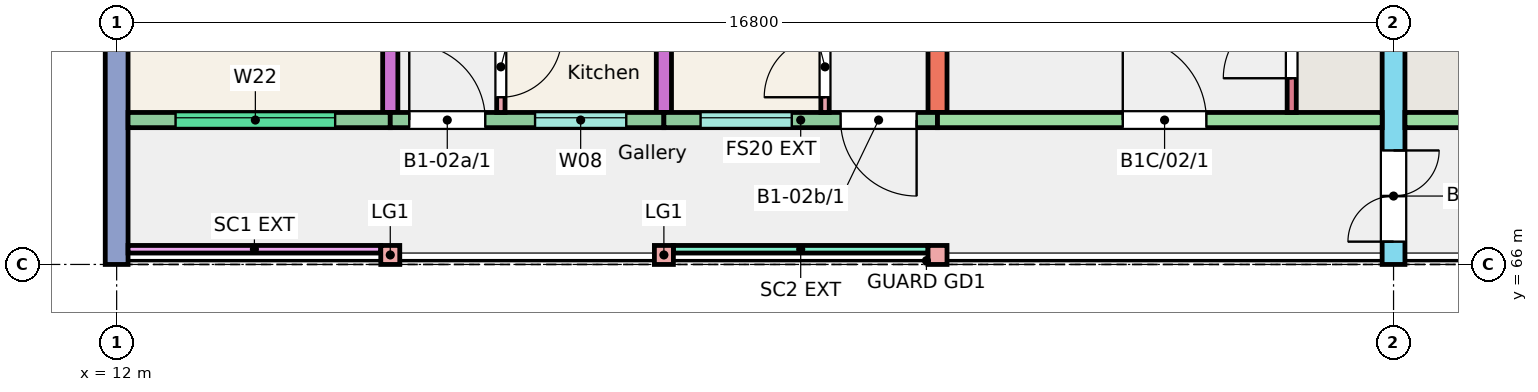
"""IFC4 building model, lengths in metres.
Left out: names, types, materials, properties, quantities, classifications, styles, units other than length and angle.
Written with IfcOpenShell. Run it as: python <this file> out.ifc"""

import sys

from ifc_helpers import new_model, si_unit, direction, frame, frame_2d, origin, origin_2d, place, context, subcontext, project, spatial, rectangle, extrude, element, fill, save


model = new_model("IFC4")
c1 = context("Model", 3, precision=1e-05, world=origin(), true_north=direction((0.0, 1.0)))
c2 = subcontext(c1, "Body", "Model", "MODEL_VIEW")
j1 = project(units=[si_unit("LENGTHUNIT", "METRE"), si_unit("PLANEANGLEUNIT", "RADIAN")], contexts=[c1])
p1 = place(None, origin())
s1 = spatial("IfcSite", under=j1, at=p1, CompositionType="ELEMENT")
p2 = place(p1, origin())
s2 = spatial("IfcBuilding", under=s1, at=p2, CompositionType="ELEMENT")
p3 = place(p2, frame((0.0, 0.0, 6.0)))
s3 = spatial("IfcBuildingStorey", under=s2, at=p3, CompositionType="ELEMENT", Elevation=6.0)
p4 = place(p3, frame((12.0, 66.0, 0.0), z_axis=(0.0, 0.0, 1.0), x_axis=(0.0, 1.0, 0.0)))
e1 = element("IfcWall", 1, at=p4, inside=s3, PredefinedType="SHEAR", context=c2, shape_type="SweptSolid", body=[
    extrude(rectangle(XDim=11.0, YDim=0.3, at=frame_2d((5.5, 0.0))), origin(), (0.0, 0.0, 1.0), 3.0),
])
p5 = place(p4, frame((3.55, 0.0, 0.9)))
e2 = element("IfcOpeningElement", 2, at=p5, cuts=e1, PredefinedType="OPENING", context=c2, shape_type="SweptSolid", body=[
    extrude(rectangle(XDim=1.5, YDim=1.5, at=frame_2d((0.75, 0.75))), frame((0.0, 0.16, 0.0), z_axis=(0.0, -1.0, 0.0), x_axis=(1.0, 0.0, 0.0)), (0.0, 0.0, 1.0), 0.32),
])
p6 = place(p4, frame((8.105, 0.0, 0.9)))
e3 = element("IfcOpeningElement", 3, at=p6, cuts=e1, PredefinedType="OPENING", context=c2, shape_type="SweptSolid", body=[
    extrude(rectangle(XDim=1.5, YDim=1.5, at=frame_2d((0.75, 0.75))), frame((0.0, 0.16, 0.0), z_axis=(0.0, -1.0, 0.0), x_axis=(1.0, 0.0, 0.0)), (0.0, 0.0, 1.0), 0.32),
])
p7 = place(p3, frame((15.6, 68.0, 0.0), z_axis=(0.0, 0.0, 1.0), x_axis=(0.0, 1.0, 0.0)))
e4 = element("IfcWall", 4, at=p7, inside=s3, PredefinedType="SHEAR", context=c2, shape_type="SweptSolid", body=[
    extrude(rectangle(XDim=9.0, YDim=0.2, at=frame_2d((4.5, 0.0))), origin(), (0.0, 0.0, 1.0), 3.0),
])
p8 = place(p7, frame((2.4, 0.0, 0.0)))
e5 = element("IfcOpeningElement", 5, at=p8, cuts=e4, PredefinedType="OPENING", context=c2, shape_type="SweptSolid", body=[
    extrude(rectangle(XDim=1.2, YDim=2.1, at=frame_2d((0.6, 1.05))), frame((0.0, 0.11, 0.0), z_axis=(0.0, -1.0, 0.0), x_axis=(1.0, 0.0, 0.0)), (0.0, 0.0, 1.0), 0.22),
])
p9 = place(p7, frame((6.4, 0.0, 0.0)))
e6 = element("IfcOpeningElement", 6, at=p9, cuts=e4, PredefinedType="OPENING", context=c2, shape_type="SweptSolid", body=[
    extrude(rectangle(XDim=1.2, YDim=2.1, at=frame_2d((0.6, 1.05))), frame((0.0, 0.11, 0.0), z_axis=(0.0, -1.0, 0.0), x_axis=(1.0, 0.0, 0.0)), (0.0, 0.0, 1.0), 0.22),
])
p10 = place(p3, frame((19.2, 68.0, 0.0), z_axis=(0.0, 0.0, 1.0), x_axis=(0.0, 1.0, 0.0)))
e7 = element("IfcWall", 7, at=p10, inside=s3, PredefinedType="SHEAR", context=c2, shape_type="SweptSolid", body=[
    extrude(rectangle(XDim=9.0, YDim=0.2, at=frame_2d((4.5, 0.0))), origin(), (0.0, 0.0, 1.0), 3.0),
])
p11 = place(p3, frame((22.8, 68.0, 0.0), z_axis=(0.0, 0.0, 1.0), x_axis=(0.0, 1.0, 0.0)))
e8 = element("IfcWall", 8, at=p11, inside=s3, PredefinedType="SHEAR", context=c2, shape_type="SweptSolid", body=[
    extrude(rectangle(XDim=9.0, YDim=0.25, at=frame_2d((4.5, 0.0))), origin(), (0.0, 0.0, 1.0), 3.0),
])
p12 = place(p3, frame((28.8, 66.0, 0.0), z_axis=(0.0, 0.0, 1.0), x_axis=(0.0, 1.0, 0.0)))
e9 = element("IfcWall", 9, at=p12, inside=s3, PredefinedType="SHEAR", context=c2, shape_type="SweptSolid", body=[
    extrude(rectangle(XDim=11.0, YDim=0.3, at=frame_2d((5.5, 0.0))), origin(), (0.0, 0.0, 1.0), 3.0),
])
p13 = place(p12, frame((0.3, 0.0, 0.0)))
e10 = element("IfcOpeningElement", 10, at=p13, cuts=e9, PredefinedType="OPENING", context=c2, shape_type="SweptSolid", body=[
    extrude(rectangle(XDim=1.2, YDim=2.1, at=frame_2d((0.6, 1.05))), frame((0.0, 0.16, 0.0), z_axis=(0.0, -1.0, 0.0), x_axis=(1.0, 0.0, 0.0)), (0.0, 0.0, 1.0), 0.32),
])
p14 = place(p3, frame((12.15, 67.9, 0.0), z_axis=(0.0, 0.0, 1.0), x_axis=(1.0, 0.0, 0.0)))
e11 = element("IfcWall", 11, at=p14, inside=s3, PredefinedType="SOLIDWALL", context=c2, shape_type="SweptSolid", body=[
    extrude(rectangle(XDim=3.45, YDim=0.2, at=frame_2d((1.725, 0.0))), origin(), (0.0, 0.0, 1.0), 3.0),
])
p15 = place(p14, frame((0.625, 0.0, 1.2)))
e12 = element("IfcOpeningElement", 12, at=p15, cuts=e11, PredefinedType="OPENING", context=c2, shape_type="SweptSolid", body=[
    extrude(rectangle(XDim=2.1, YDim=1.2, at=frame_2d((1.05, 0.6))), frame((0.0, 0.11, 0.0), z_axis=(0.0, -1.0, 0.0), x_axis=(1.0, 0.0, 0.0)), (0.0, 0.0, 1.0), 0.22),
])
p16 = place(p3, frame((15.6, 67.9, 0.0), z_axis=(0.0, 0.0, 1.0), x_axis=(1.0, 0.0, 0.0)))
e13 = element("IfcWall", 13, at=p16, inside=s3, PredefinedType="SOLIDWALL", context=c2, shape_type="SweptSolid", body=[
    extrude(rectangle(XDim=3.6, YDim=0.2, at=frame_2d((1.8, 0.0))), origin(), (0.0, 0.0, 1.0), 3.0),
])
p17 = place(p16, frame((1.905, 0.0, 1.1)))
e14 = element("IfcOpeningElement", 14, at=p17, cuts=e13, PredefinedType="OPENING", context=c2, shape_type="SweptSolid", body=[
    extrude(rectangle(XDim=1.2, YDim=1.3, at=frame_2d((0.6, 0.65))), frame((0.0, 0.11, 0.0), z_axis=(0.0, -1.0, 0.0), x_axis=(1.0, 0.0, 0.0)), (0.0, 0.0, 1.0), 0.22),
])
p18 = place(p16, frame((0.25, 0.0, 0.0)))
e15 = element("IfcOpeningElement", 15, at=p18, cuts=e13, PredefinedType="OPENING", context=c2, shape_type="SweptSolid", body=[
    extrude(rectangle(XDim=1.0, YDim=2.1, at=frame_2d((0.5, 1.05))), frame((0.0, 0.11, 0.0), z_axis=(0.0, -1.0, 0.0), x_axis=(1.0, 0.0, 0.0)), (0.0, 0.0, 1.0), 0.22),
])
p19 = place(p3, frame((19.2, 67.9, 0.0), z_axis=(0.0, 0.0, 1.0), x_axis=(1.0, 0.0, 0.0)))
e16 = element("IfcWall", 16, at=p19, inside=s3, PredefinedType="SOLIDWALL", context=c2, shape_type="SweptSolid", body=[
    extrude(rectangle(XDim=3.6, YDim=0.2, at=frame_2d((1.8, 0.0))), origin(), (0.0, 0.0, 1.0), 3.0),
])
p20 = place(p19, frame((0.482, 0.0, 1.1)))
e17 = element("IfcOpeningElement", 17, at=p20, cuts=e16, PredefinedType="OPENING", context=c2, shape_type="SweptSolid", body=[
    extrude(rectangle(XDim=1.2, YDim=1.3, at=frame_2d((0.6, 0.65))), frame((0.0, 0.11, 0.0), z_axis=(0.0, -1.0, 0.0), x_axis=(1.0, 0.0, 0.0)), (0.0, 0.0, 1.0), 0.22),
])
p21 = place(p19, frame((2.325, 0.0, 0.0)))
e18 = element("IfcOpeningElement", 18, at=p21, cuts=e16, PredefinedType="OPENING", context=c2, shape_type="SweptSolid", body=[
    extrude(rectangle(XDim=1.0, YDim=2.1, at=frame_2d((0.5, 1.05))), frame((0.0, 0.11, 0.0), z_axis=(0.0, -1.0, 0.0), x_axis=(1.0, 0.0, 0.0)), (0.0, 0.0, 1.0), 0.22),
])
p22 = place(p3, frame((22.8, 67.9, 0.0), z_axis=(0.0, 0.0, 1.0), x_axis=(1.0, 0.0, 0.0)))
e19 = element("IfcWall", 19, at=p22, inside=s3, PredefinedType="SHEAR", context=c2, shape_type="SweptSolid", body=[
    extrude(rectangle(XDim=5.85, YDim=0.2, at=frame_2d((2.925, 0.0))), origin(), (0.0, 0.0, 1.0), 3.0),
])
p23 = place(p22, frame((2.438, 0.0, 0.0)))
e20 = element("IfcOpeningElement", 20, at=p23, cuts=e19, PredefinedType="OPENING", context=c2, shape_type="SweptSolid", body=[
    extrude(rectangle(XDim=1.1, YDim=2.1, at=frame_2d((0.55, 1.05))), frame((0.0, 0.11, 0.0), z_axis=(0.0, -1.0, 0.0), x_axis=(1.0, 0.0, 0.0)), (0.0, 0.0, 1.0), 0.22),
])
p24 = place(p3, frame((27.46, 68.0, 0.0), z_axis=(0.0, 0.0, 1.0), x_axis=(0.0, 1.0, 0.0)))
e21 = element("IfcWall", 21, at=p24, inside=s3, PredefinedType="SHEAR", context=c2, shape_type="SweptSolid", body=[
    extrude(rectangle(XDim=1.72, YDim=0.12, at=frame_2d((0.86, 0.0))), origin(), (0.0, 0.0, 1.0), 3.0),
])
p25 = place(p24, frame((0.45, 0.0, 0.0)))
e22 = element("IfcOpeningElement", 22, at=p25, cuts=e21, PredefinedType="OPENING", context=c2, shape_type="SweptSolid", body=[
    extrude(rectangle(XDim=0.9, YDim=2.1, at=frame_2d((0.45, 1.05))), frame((0.0, 0.07, 0.0), z_axis=(0.0, -1.0, 0.0), x_axis=(1.0, 0.0, 0.0)), (0.0, 0.0, 1.0), 0.14),
])
p26 = place(p3, frame((28.95, 67.9, 0.0), z_axis=(0.0, 0.0, 1.0), x_axis=(1.0, 0.0, 0.0)))
e23 = element("IfcWall", 23, at=p26, inside=s3, PredefinedType="SHEAR", context=c2, shape_type="SweptSolid", body=[
    extrude(rectangle(XDim=5.85, YDim=0.2, at=frame_2d((2.925, 0.0))), origin(), (0.0, 0.0, 1.0), 3.0),
])
p27 = place(p26, frame((2.312, 0.0, 0.0)))
e24 = element("IfcOpeningElement", 24, at=p27, cuts=e23, PredefinedType="OPENING", context=c2, shape_type="SweptSolid", body=[
    extrude(rectangle(XDim=1.1, YDim=2.1, at=frame_2d((0.55, 1.05))), frame((0.0, 0.11, 0.0), z_axis=(0.0, -1.0, 0.0), x_axis=(1.0, 0.0, 0.0)), (0.0, 0.0, 1.0), 0.22),
])
for number, where, z_axis, x_axis in (
    (25, (15.6, 66.125, 0.0), (0.0, 0.0, 1.0), (1.0, 0.0, 0.0)),
    (26, (19.2, 66.125, 0.0), (0.0, 0.0, 1.0), (1.0, 0.0, 0.0)),
    (27, (22.8, 66.125, 0.0), (0.0, 0.0, 1.0), (1.0, 0.0, 0.0)),
):
    element("IfcColumn", number, at=place(p3, frame(where, z_axis=z_axis, x_axis=x_axis)), inside=s3, PredefinedType="COLUMN", context=c2, shape_type="SweptSolid", body=[
        extrude(rectangle(XDim=0.25, YDim=0.25, at=origin_2d()), origin(), (0.0, 0.0, 1.0), 3.0),
    ])
p28 = place(p3, frame((12.15, 66.2, 0.0), z_axis=(0.0, 0.0, 1.0), x_axis=(1.0, 0.0, 0.0)))
e28 = element("IfcWall", 28, at=p28, inside=s3, PredefinedType="SOLIDWALL", context=c2, shape_type="SweptSolid", body=[
    extrude(rectangle(XDim=3.325, YDim=0.1, at=frame_2d((1.663, 0.0))), origin(), (0.0, 0.0, 1.0), 2.45),
])
p29 = place(p3, frame((19.325, 66.2, 0.0), z_axis=(0.0, 0.0, 1.0), x_axis=(1.0, 0.0, 0.0)))
e29 = element("IfcWall", 29, at=p29, inside=s3, PredefinedType="SOLIDWALL", context=c2, shape_type="SweptSolid", body=[
    extrude(rectangle(XDim=3.35, YDim=0.1, at=frame_2d((1.675, 0.0))), origin(), (0.0, 0.0, 1.0), 2.45),
])
p30 = place(p3, frame((17.055, 68.0, 0.0), z_axis=(0.0, 0.0, 1.0), x_axis=(0.0, 1.0, 0.0)))
e30 = element("IfcWall", 30, at=p30, inside=s3, PredefinedType="PARTITIONING", context=c2, shape_type="SweptSolid", body=[
    extrude(rectangle(XDim=4.7, YDim=0.11, at=frame_2d((2.35, 0.0))), origin(), (0.0, 0.0, 1.0), 2.8),
])
p31 = place(p30, frame((0.2, 0.0, 0.0)))
e31 = element("IfcOpeningElement", 31, at=p31, cuts=e30, PredefinedType="OPENING", context=c2, shape_type="SweptSolid", body=[
    extrude(rectangle(XDim=0.8, YDim=2.1, at=frame_2d((0.4, 1.05))), frame((0.0, 0.065, 0.0), z_axis=(0.0, -1.0, 0.0), x_axis=(1.0, 0.0, 0.0)), (0.0, 0.0, 1.0), 0.13),
])
p32 = place(p30, frame((3.75, 0.0, 0.0)))
e32 = element("IfcOpeningElement", 32, at=p32, cuts=e30, PredefinedType="OPENING", context=c2, shape_type="SweptSolid", body=[
    extrude(rectangle(XDim=0.8, YDim=2.1, at=frame_2d((0.4, 1.05))), frame((0.0, 0.065, 0.0), z_axis=(0.0, -1.0, 0.0), x_axis=(1.0, 0.0, 0.0)), (0.0, 0.0, 1.0), 0.13),
])
p33 = place(p3, frame((21.32, 68.0, 0.0), z_axis=(0.0, 0.0, 1.0), x_axis=(0.0, 1.0, 0.0)))
e33 = element("IfcWall", 33, at=p33, inside=s3, PredefinedType="PARTITIONING", context=c2, shape_type="SweptSolid", body=[
    extrude(rectangle(XDim=4.7, YDim=0.11, at=frame_2d((2.35, 0.0))), origin(), (0.0, 0.0, 1.0), 2.8),
])
p34 = place(p33, frame((0.2, 0.0, 0.0)))
e34 = element("IfcOpeningElement", 34, at=p34, cuts=e33, PredefinedType="OPENING", context=c2, shape_type="SweptSolid", body=[
    extrude(rectangle(XDim=0.8, YDim=2.1, at=frame_2d((0.4, 1.05))), frame((0.0, 0.065, 0.0), z_axis=(0.0, -1.0, 0.0), x_axis=(1.0, 0.0, 0.0)), (0.0, 0.0, 1.0), 0.13),
])
p35 = place(p33, frame((3.75, 0.0, 0.0)))
e35 = element("IfcOpeningElement", 35, at=p35, cuts=e33, PredefinedType="OPENING", context=c2, shape_type="SweptSolid", body=[
    extrude(rectangle(XDim=0.8, YDim=2.1, at=frame_2d((0.4, 1.05))), frame((0.0, 0.065, 0.0), z_axis=(0.0, -1.0, 0.0), x_axis=(1.0, 0.0, 0.0)), (0.0, 0.0, 1.0), 0.13),
])
p36 = place(p15, origin())
e36 = element("IfcWindow", 36, at=p36, inside=s3, PartitioningType="SINGLE_PANEL", PredefinedType="WINDOW", context=c2, shape_type="SweptSolid", body=[
    extrude(rectangle(XDim=2.1, YDim=1.2, at=frame_2d((1.05, 0.6))), frame((0.0, 0.06, 0.0), z_axis=(0.0, -1.0, 0.0), x_axis=(1.0, 0.0, 0.0)), (0.0, 0.0, 1.0), 0.06),
])
fill(e12, e36)
p37 = place(p17, origin())
e37 = element("IfcWindow", 37, at=p37, inside=s3, PartitioningType="SINGLE_PANEL", PredefinedType="WINDOW", context=c2, shape_type="SweptSolid", body=[
    extrude(rectangle(XDim=1.2, YDim=1.3, at=frame_2d((0.6, 0.65))), frame((0.0, 0.06, 0.0), z_axis=(0.0, -1.0, 0.0), x_axis=(1.0, 0.0, 0.0)), (0.0, 0.0, 1.0), 0.06),
])
fill(e14, e37)
p38 = place(p20, origin())
e38 = element("IfcWindow", 38, at=p38, inside=s3, PartitioningType="SINGLE_PANEL", PredefinedType="WINDOW", context=c2, shape_type="SweptSolid", body=[
    extrude(rectangle(XDim=1.2, YDim=1.3, at=frame_2d((0.6, 0.65))), frame((0.0, 0.06, 0.0), z_axis=(0.0, -1.0, 0.0), x_axis=(1.0, 0.0, 0.0)), (0.0, 0.0, 1.0), 0.06),
])
fill(e17, e38)
p39 = place(p18, origin())
e39 = element("IfcDoor", 39, at=p39, inside=s3, OperationType="SINGLE_SWING_LEFT", PredefinedType="DOOR", context=c2, shape_type="SweptSolid", body=[
    extrude(rectangle(XDim=1.0, YDim=2.1, at=frame_2d((0.5, 1.05))), frame((0.0, 0.025, 0.0), z_axis=(0.0, -1.0, 0.0), x_axis=(1.0, 0.0, 0.0)), (0.0, 0.0, 1.0), 0.05),
])
fill(e15, e39)
p40 = place(p31, origin())
e40 = element("IfcDoor", 40, at=p40, inside=s3, OperationType="SINGLE_SWING_RIGHT", PredefinedType="DOOR", context=c2, shape_type="SweptSolid", body=[
    extrude(rectangle(XDim=0.8, YDim=2.1, at=frame_2d((0.4, 1.05))), frame((0.0, 0.025, 0.0), z_axis=(0.0, -1.0, 0.0), x_axis=(1.0, 0.0, 0.0)), (0.0, 0.0, 1.0), 0.05),
])
fill(e31, e40)
p41 = place(p21, origin())
e41 = element("IfcDoor", 41, at=p41, inside=s3, OperationType="SINGLE_SWING_RIGHT", PredefinedType="DOOR", context=c2, shape_type="SweptSolid", body=[
    extrude(rectangle(XDim=1.0, YDim=2.1, at=frame_2d((0.5, 1.05))), frame((0.0, 0.025, 0.0), z_axis=(0.0, -1.0, 0.0), x_axis=(1.0, 0.0, 0.0)), (0.0, 0.0, 1.0), 0.05),
])
fill(e18, e41)
p42 = place(p34, origin())
e42 = element("IfcDoor", 42, at=p42, inside=s3, OperationType="SINGLE_SWING_LEFT", PredefinedType="DOOR", context=c2, shape_type="SweptSolid", body=[
    extrude(rectangle(XDim=0.8, YDim=2.1, at=frame_2d((0.4, 1.05))), frame((0.0, 0.025, 0.0), z_axis=(0.0, -1.0, 0.0), x_axis=(1.0, 0.0, 0.0)), (0.0, 0.0, 1.0), 0.05),
])
fill(e34, e42)
p43 = place(p23, origin())
e43 = element("IfcDoor", 43, at=p43, inside=s3, OperationType="SINGLE_SWING_LEFT", PredefinedType="DOOR", context=c2, shape_type="SweptSolid", body=[
    extrude(rectangle(XDim=1.1, YDim=2.1, at=frame_2d((0.55, 1.05))), frame((0.0, 0.025, 0.0), z_axis=(0.0, -1.0, 0.0), x_axis=(1.0, 0.0, 0.0)), (0.0, 0.0, 1.0), 0.05),
])
fill(e20, e43)
p44 = place(p25, origin())
e44 = element("IfcDoor", 44, at=p44, inside=s3, OperationType="SINGLE_SWING_LEFT", PredefinedType="DOOR", context=c2, shape_type="SweptSolid", body=[
    extrude(rectangle(XDim=0.9, YDim=2.1, at=frame_2d((0.45, 1.05))), frame((0.0, 0.025, 0.0), z_axis=(0.0, -1.0, 0.0), x_axis=(1.0, 0.0, 0.0)), (0.0, 0.0, 1.0), 0.05),
])
fill(e22, e44)
p45 = place(p13, origin())
e45 = element("IfcDoor", 45, at=p45, inside=s3, OperationType="DOUBLE_DOOR_SINGLE_SWING", PredefinedType="DOOR", context=c2, shape_type="SweptSolid", body=[
    extrude(rectangle(XDim=1.2, YDim=2.1, at=frame_2d((0.6, 1.05))), frame((0.0, 0.025, 0.0), z_axis=(0.0, -1.0, 0.0), x_axis=(1.0, 0.0, 0.0)), (0.0, 0.0, 1.0), 0.05),
])
fill(e10, e45)
save(model, sys.argv[1])
